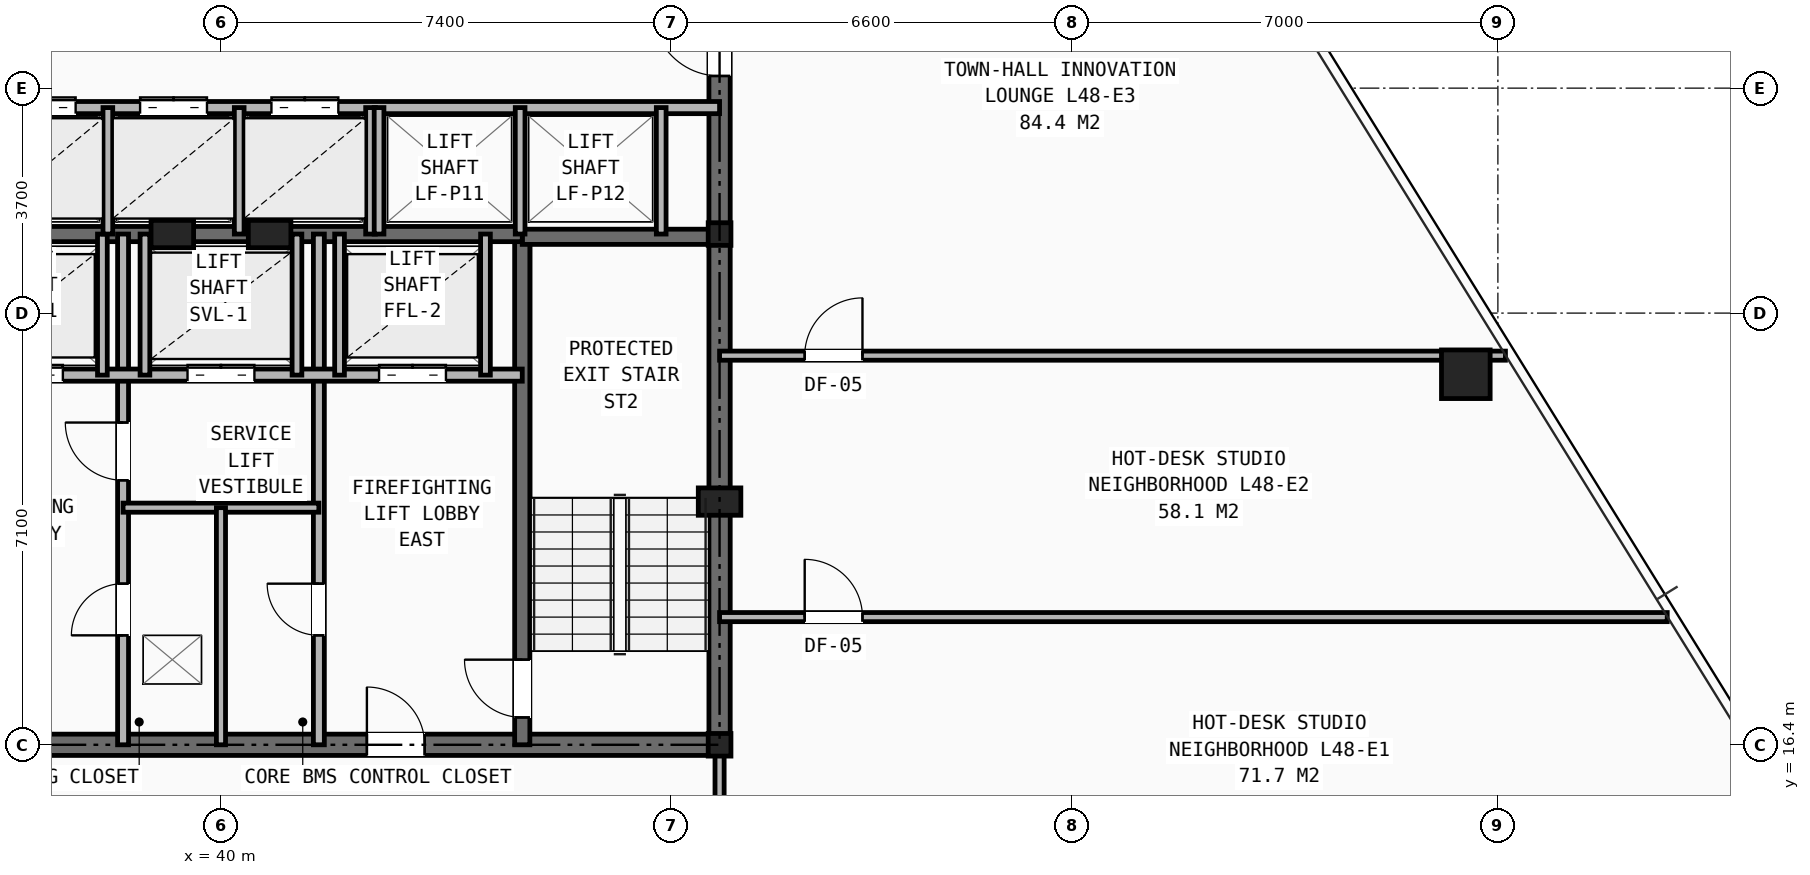
"""IFC4 building model, lengths in metres.
Left out: names, types, materials, properties, quantities, classifications, styles, units other than length and angle.
Written with IfcOpenShell. Run it as: python <this file> out.ifc"""

import sys

from ifc_helpers import new_model, si_unit, direction, frame, frame_2d, origin, origin_2d, place, context, subcontext, project, spatial, rectangle, hollow_rectangle, i_section, extrude, element, fill, save


model = new_model("IFC4")
c1 = context("Model", 3, precision=1e-05, world=origin(), true_north=direction((0.0, 1.0)))
c2 = subcontext(c1, "Body", "Model", "MODEL_VIEW")
j1 = project(units=[si_unit("LENGTHUNIT", "METRE"), si_unit("PLANEANGLEUNIT", "RADIAN")], contexts=[c1])
p1 = place(None, origin())
s1 = spatial("IfcSite", under=j1, at=p1, CompositionType="ELEMENT")
p2 = place(p1, origin())
s2 = spatial("IfcBuilding", under=s1, at=p2, CompositionType="ELEMENT")
p3 = place(p2, frame((0.0, 0.0, 168.9)))
s3 = spatial("IfcBuildingStorey", under=s2, at=p3, CompositionType="ELEMENT", Elevation=168.9)
for number, where, z_axis, x_axis in (
    (1, (48.2, 16.4, 0.0), (0.0, 0.0, 1.0), (1.0, 0.0, 0.0)),
    (2, (48.2, 24.8, 0.0), (0.0, 0.0, 1.0), (1.0, 0.0, 0.0)),
):
    element("IfcColumn", number, at=place(p3, frame(where, z_axis=z_axis, x_axis=x_axis)), inside=s3, PredefinedType="COLUMN", context=c2, shape_type="SweptSolid", body=[
        extrude(i_section(OverallWidth=0.374, OverallDepth=0.372, WebThickness=0.016, FlangeThickness=0.026, at=origin_2d()), origin(), (0.0, 0.0, 1.0), 3.45),
    ])
for number, where, z_axis, x_axis in (
    (3, (48.2, 20.4, 0.0), (0.0, 0.0, 1.0), (1.0, 0.0, 0.0)),
    (4, (39.2, 24.8, 0.0), (0.0, 0.0, 1.0), (1.0, 0.0, 0.0)),
    (5, (40.8, 24.8, 0.0), (0.0, 0.0, 1.0), (1.0, 0.0, 0.0)),
):
    element("IfcColumn", number, at=place(p3, frame(where, z_axis=z_axis, x_axis=x_axis)), inside=s3, PredefinedType="PILASTER", context=c2, shape_type="SweptSolid", body=[
        extrude(rectangle(XDim=0.7, YDim=0.45, at=origin_2d()), origin(), (0.0, 0.0, 1.0), 3.45),
    ])
p4 = place(p3, frame((60.473, 22.494, 0.0), z_axis=(0.0, 0.0, 1.0), x_axis=(1.0, 0.0, 0.0)))
e6 = element("IfcColumn", 6, at=p4, inside=s3, PredefinedType="COLUMN", context=c2, shape_type="SweptSolid", body=[
    extrude(hollow_rectangle(XDim=0.8, YDim=0.8, WallThickness=0.055, at=origin_2d()), origin(), (0.0, 0.0, 1.0), 3.45),
])
p5 = place(p3, frame((31.8, 16.4, 0.0), z_axis=(0.0, 0.0, 1.0), x_axis=(1.0, 0.0, 0.0)))
e7 = element("IfcWall", 7, at=p5, inside=s3, PredefinedType="SHEAR", context=c2, shape_type="SweptSolid", body=[
    extrude(rectangle(XDim=16.4, YDim=0.35, at=frame_2d((8.2, 0.0))), origin(), (0.0, 0.0, 1.0), 3.21),
])
p6 = place(p5, frame((4.2, 0.0, 0.0)))
e8 = element("IfcOpeningElement", 8, at=p6, cuts=e7, PredefinedType="OPENING", context=c2, shape_type="SweptSolid", body=[
    extrude(rectangle(XDim=0.95, YDim=2.1, at=frame_2d((0.475, 1.05))), frame((0.0, 0.185, 0.0), z_axis=(0.0, -1.0, 0.0), x_axis=(1.0, 0.0, 0.0)), (0.0, 0.0, 1.0), 0.37),
])
p7 = place(p5, frame((10.6, 0.0, 0.0)))
e9 = element("IfcOpeningElement", 9, at=p7, cuts=e7, PredefinedType="OPENING", context=c2, shape_type="SweptSolid", body=[
    extrude(rectangle(XDim=0.95, YDim=2.1, at=frame_2d((0.475, 1.05))), frame((0.0, 0.185, 0.0), z_axis=(0.0, -1.0, 0.0), x_axis=(1.0, 0.0, 0.0)), (0.0, 0.0, 1.0), 0.37),
])
p8 = place(p3, frame((48.2, 16.4, 0.0), z_axis=(0.0, 0.0, 1.0), x_axis=(0.0, 1.0, 0.0)))
e10 = element("IfcWall", 10, at=p8, inside=s3, PredefinedType="SHEAR", context=c2, shape_type="SweptSolid", body=[
    extrude(rectangle(XDim=14.8, YDim=0.35, at=frame_2d((7.4, 0.0))), origin(), (0.0, 0.0, 1.0), 3.21),
])
p9 = place(p8, frame((11.0, 0.0, 0.0)))
e11 = element("IfcOpeningElement", 11, at=p9, cuts=e10, PredefinedType="OPENING", context=c2, shape_type="SweptSolid", body=[
    extrude(rectangle(XDim=1.1, YDim=2.15, at=frame_2d((0.55, 1.075))), frame((0.0, 0.185, 0.0), z_axis=(0.0, -1.0, 0.0), x_axis=(1.0, 0.0, 0.0)), (0.0, 0.0, 1.0), 0.37),
])
p10 = place(p3, frame((44.955, 16.4, 0.0), z_axis=(0.0, 0.0, 1.0), x_axis=(0.0, 1.0, 0.0)))
e12 = element("IfcWall", 12, at=p10, inside=s3, PredefinedType="SHEAR", context=c2, shape_type="SweptSolid", body=[
    extrude(rectangle(XDim=8.4, YDim=0.25, at=frame_2d((4.2, 0.0))), origin(), (0.0, 0.0, 1.0), 3.21),
])
p11 = place(p10, frame((0.45, 0.0, 0.0)))
e13 = element("IfcOpeningElement", 13, at=p11, cuts=e12, PredefinedType="OPENING", context=c2, shape_type="SweptSolid", body=[
    extrude(rectangle(XDim=0.95, YDim=2.1, at=frame_2d((0.475, 1.05))), frame((0.0, 0.135, 0.0), z_axis=(0.0, -1.0, 0.0), x_axis=(1.0, 0.0, 0.0)), (0.0, 0.0, 1.0), 0.27),
])
p12 = place(p3, frame((44.955, 24.755, 0.0), z_axis=(0.0, 0.0, 1.0), x_axis=(1.0, 0.0, 0.0)))
e14 = element("IfcWall", 14, at=p12, inside=s3, PredefinedType="SHEAR", context=c2, shape_type="SweptSolid", body=[
    extrude(rectangle(XDim=3.245, YDim=0.25, at=frame_2d((1.623, 0.0))), origin(), (0.0, 0.0, 1.0), 3.21),
])
p13 = place(p3, frame((35.045, 24.8, 0.0), z_axis=(0.0, 0.0, 1.0), x_axis=(1.0, 0.0, 0.0)))
e15 = element("IfcWall", 15, at=p13, inside=s3, PredefinedType="SHEAR", context=c2, shape_type="SweptSolid", body=[
    extrude(rectangle(XDim=9.91, YDim=0.25, at=frame_2d((4.955, 0.0))), origin(), (0.0, 0.0, 1.0), 3.21),
])
p14 = place(p3, frame((38.39, 16.4, 0.0), z_axis=(0.0, 0.0, 1.0), x_axis=(0.0, 1.0, 0.0)))
e16 = element("IfcWall", 16, at=p14, inside=s3, PredefinedType="PARTITIONING", context=c2, shape_type="SweptSolid", body=[
    extrude(rectangle(XDim=8.4, YDim=0.18, at=frame_2d((4.2, 0.0))), origin(), (0.0, 0.0, 1.0), 2.665),
])
p15 = place(p14, frame((1.8, 0.0, 0.0)))
e17 = element("IfcOpeningElement", 17, at=p15, cuts=e16, PredefinedType="OPENING", context=c2, shape_type="SweptSolid", body=[
    extrude(rectangle(XDim=0.85, YDim=2.05, at=frame_2d((0.425, 1.025))), frame((0.0, 0.1, 0.0), z_axis=(0.0, -1.0, 0.0), x_axis=(1.0, 0.0, 0.0)), (0.0, 0.0, 1.0), 0.2),
])
p16 = place(p14, frame((4.35, 0.0, 0.0)))
e18 = element("IfcOpeningElement", 18, at=p16, cuts=e16, PredefinedType="OPENING", context=c2, shape_type="SweptSolid", body=[
    extrude(rectangle(XDim=0.95, YDim=2.1, at=frame_2d((0.475, 1.05))), frame((0.0, 0.1, 0.0), z_axis=(0.0, -1.0, 0.0), x_axis=(1.0, 0.0, 0.0)), (0.0, 0.0, 1.0), 0.2),
])
p17 = place(p3, frame((41.61, 16.4, 0.0), z_axis=(0.0, 0.0, 1.0), x_axis=(0.0, 1.0, 0.0)))
e19 = element("IfcWall", 19, at=p17, inside=s3, PredefinedType="PARTITIONING", context=c2, shape_type="SweptSolid", body=[
    extrude(rectangle(XDim=8.4, YDim=0.18, at=frame_2d((4.2, 0.0))), origin(), (0.0, 0.0, 1.0), 2.665),
])
p18 = place(p17, frame((1.8, 0.0, 0.0)))
e20 = element("IfcOpeningElement", 20, at=p18, cuts=e19, PredefinedType="OPENING", context=c2, shape_type="SweptSolid", body=[
    extrude(rectangle(XDim=0.85, YDim=2.05, at=frame_2d((0.425, 1.025))), frame((0.0, 0.1, 0.0), z_axis=(0.0, -1.0, 0.0), x_axis=(1.0, 0.0, 0.0)), (0.0, 0.0, 1.0), 0.2),
])
p19 = place(p3, frame((35.045, 22.48, 0.0), z_axis=(0.0, 0.0, 1.0), x_axis=(1.0, 0.0, 0.0)))
e21 = element("IfcWall", 21, at=p19, inside=s3, PredefinedType="SOLIDWALL", context=c2, shape_type="SweptSolid", body=[
    extrude(rectangle(XDim=9.91, YDim=0.2, at=frame_2d((4.955, 0.0))), origin(), (0.0, 0.0, 1.0), 3.21),
])
p20 = place(p19, frame((1.255, 0.0, 0.0)))
e22 = element("IfcOpeningElement", 22, at=p20, cuts=e21, PredefinedType="OPENING", context=c2, shape_type="SweptSolid", body=[
    extrude(rectangle(XDim=1.1, YDim=2.15, at=frame_2d((0.55, 1.075))), frame((0.0, 0.11, 0.0), z_axis=(0.0, -1.0, 0.0), x_axis=(1.0, 0.0, 0.0)), (0.0, 0.0, 1.0), 0.22),
])
p21 = place(p19, frame((7.555, 0.0, 0.0)))
e23 = element("IfcOpeningElement", 23, at=p21, cuts=e21, PredefinedType="OPENING", context=c2, shape_type="SweptSolid", body=[
    extrude(rectangle(XDim=1.1, YDim=2.15, at=frame_2d((0.55, 1.075))), frame((0.0, 0.11, 0.0), z_axis=(0.0, -1.0, 0.0), x_axis=(1.0, 0.0, 0.0)), (0.0, 0.0, 1.0), 0.22),
])
p22 = place(p19, frame((4.405, 0.0, 0.0)))
e24 = element("IfcOpeningElement", 24, at=p22, cuts=e21, PredefinedType="OPENING", context=c2, shape_type="SweptSolid", body=[
    extrude(rectangle(XDim=1.1, YDim=2.15, at=frame_2d((0.55, 1.075))), frame((0.0, 0.11, 0.0), z_axis=(0.0, -1.0, 0.0), x_axis=(1.0, 0.0, 0.0)), (0.0, 0.0, 1.0), 0.22),
])
p23 = place(p3, frame((38.39, 20.3, 0.0), z_axis=(0.0, 0.0, 1.0), x_axis=(1.0, 0.0, 0.0)))
e25 = element("IfcWall", 25, at=p23, inside=s3, PredefinedType="PARTITIONING", context=c2, shape_type="SweptSolid", body=[
    extrude(rectangle(XDim=3.22, YDim=0.15, at=frame_2d((1.61, 0.0))), origin(), (0.0, 0.0, 1.0), 3.21),
])
p24 = place(p3, frame((40.0, 16.4, 0.0), z_axis=(0.0, 0.0, 1.0), x_axis=(0.0, 1.0, 0.0)))
e26 = element("IfcWall", 26, at=p24, inside=s3, PredefinedType="PARTITIONING", context=c2, shape_type="SweptSolid", body=[
    extrude(rectangle(XDim=3.9, YDim=0.15, at=frame_2d((1.95, 0.0))), origin(), (0.0, 0.0, 1.0), 2.665),
])
for number, where, z_axis, x_axis in (
    (27, (38.05, 22.48, 0.0), (0.0, 0.0, 1.0), (0.0, 1.0, 0.0)),
    (28, (41.95, 22.48, 0.0), (0.0, 0.0, 1.0), (0.0, 1.0, 0.0)),
    (29, (44.35, 22.48, 0.0), (0.0, 0.0, 1.0), (0.0, 1.0, 0.0)),
    (30, (38.75, 22.48, 0.0), (0.0, 0.0, 1.0), (0.0, 1.0, 0.0)),
    (31, (41.25, 22.48, 0.0), (0.0, 0.0, 1.0), (0.0, 1.0, 0.0)),
):
    element("IfcWall", number, at=place(p3, frame(where, z_axis=z_axis, x_axis=x_axis)), inside=s3, PredefinedType="SOLIDWALL", context=c2, shape_type="SweptSolid", body=[
        extrude(rectangle(XDim=2.32, YDim=0.16, at=frame_2d((1.16, 0.0))), origin(), (0.0, 0.0, 1.0), 3.21),
    ])
p25 = place(p3, frame((33.82, 26.88, 0.0), z_axis=(0.0, 0.0, 1.0), x_axis=(1.0, 0.0, 0.0)))
e32 = element("IfcWall", 32, at=p25, inside=s3, PredefinedType="SOLIDWALL", context=c2, shape_type="SweptSolid", body=[
    extrude(rectangle(XDim=14.38, YDim=0.2, at=frame_2d((7.19, 0.0))), origin(), (0.0, 0.0, 1.0), 2.665),
])
p26 = place(p25, frame((0.53, 0.0, 0.0)))
e33 = element("IfcOpeningElement", 33, at=p26, cuts=e32, PredefinedType="OPENING", context=c2, shape_type="SweptSolid", body=[
    extrude(rectangle(XDim=1.1, YDim=2.15, at=frame_2d((0.55, 1.075))), frame((0.0, 0.11, 0.0), z_axis=(0.0, -1.0, 0.0), x_axis=(1.0, 0.0, 0.0)), (0.0, 0.0, 1.0), 0.22),
])
p27 = place(p25, frame((2.69, 0.0, 0.0)))
e34 = element("IfcOpeningElement", 34, at=p27, cuts=e32, PredefinedType="OPENING", context=c2, shape_type="SweptSolid", body=[
    extrude(rectangle(XDim=1.1, YDim=2.15, at=frame_2d((0.55, 1.075))), frame((0.0, 0.11, 0.0), z_axis=(0.0, -1.0, 0.0), x_axis=(1.0, 0.0, 0.0)), (0.0, 0.0, 1.0), 0.22),
])
p28 = place(p25, frame((4.85, 0.0, 0.0)))
e35 = element("IfcOpeningElement", 35, at=p28, cuts=e32, PredefinedType="OPENING", context=c2, shape_type="SweptSolid", body=[
    extrude(rectangle(XDim=1.1, YDim=2.15, at=frame_2d((0.55, 1.075))), frame((0.0, 0.11, 0.0), z_axis=(0.0, -1.0, 0.0), x_axis=(1.0, 0.0, 0.0)), (0.0, 0.0, 1.0), 0.22),
])
p29 = place(p25, frame((7.01, 0.0, 0.0)))
e36 = element("IfcOpeningElement", 36, at=p29, cuts=e32, PredefinedType="OPENING", context=c2, shape_type="SweptSolid", body=[
    extrude(rectangle(XDim=1.1, YDim=2.15, at=frame_2d((0.55, 1.075))), frame((0.0, 0.11, 0.0), z_axis=(0.0, -1.0, 0.0), x_axis=(1.0, 0.0, 0.0)), (0.0, 0.0, 1.0), 0.22),
])
for number, where, z_axis, x_axis in (
    (37, (38.14, 24.8, 0.0), (0.0, 0.0, 1.0), (0.0, 1.0, 0.0)),
    (38, (40.3, 24.8, 0.0), (0.0, 0.0, 1.0), (0.0, 1.0, 0.0)),
    (39, (42.46, 24.8, 0.0), (0.0, 0.0, 1.0), (0.0, 1.0, 0.0)),
    (40, (42.6, 24.8, 0.0), (0.0, 0.0, 1.0), (0.0, 1.0, 0.0)),
    (41, (44.92, 24.8, 0.0), (0.0, 0.0, 1.0), (0.0, 1.0, 0.0)),
    (42, (47.24, 24.8, 0.0), (0.0, 0.0, 1.0), (0.0, 1.0, 0.0)),
):
    element("IfcWall", number, at=place(p3, frame(where, z_axis=z_axis, x_axis=x_axis)), inside=s3, PredefinedType="SOLIDWALL", context=c2, shape_type="SweptSolid", body=[
        extrude(rectangle(XDim=2.08, YDim=0.16, at=frame_2d((1.04, 0.0))), origin(), (0.0, 0.0, 1.0), 3.21),
    ])
p30 = place(p3, frame((48.2, 14.1, 0.0), z_axis=(0.0, 0.0, 1.0), x_axis=(0.0, 1.0, 0.0)))
e43 = element("IfcWall", 43, at=p30, inside=s3, PredefinedType="PARTITIONING", context=c2, shape_type="SweptSolid", body=[
    extrude(rectangle(XDim=2.3, YDim=0.15, at=frame_2d((1.15, 0.0))), origin(), (0.0, 0.0, 1.0), 2.665),
])
p31 = place(p3, frame((48.2, 18.5, 0.0), z_axis=(0.0, 0.0, 1.0), x_axis=(1.0, 0.0, 0.0)))
e44 = element("IfcWall", 44, at=p31, inside=s3, PredefinedType="PARTITIONING", context=c2, shape_type="SweptSolid", body=[
    extrude(rectangle(XDim=15.585, YDim=0.15, at=frame_2d((7.792, 0.0))), origin(), (0.0, 0.0, 1.0), 2.589),
])
p32 = place(p31, frame((1.4, 0.0, 0.0)))
e45 = element("IfcOpeningElement", 45, at=p32, cuts=e44, PredefinedType="OPENING", context=c2, shape_type="SweptSolid", body=[
    extrude(rectangle(XDim=0.95, YDim=2.1, at=frame_2d((0.475, 1.05))), frame((0.0, 0.085, 0.0), z_axis=(0.0, -1.0, 0.0), x_axis=(1.0, 0.0, 0.0)), (0.0, 0.0, 1.0), 0.17),
])
p33 = place(p3, frame((48.2, 22.8, 0.0), z_axis=(0.0, 0.0, 1.0), x_axis=(1.0, 0.0, 0.0)))
e46 = element("IfcWall", 46, at=p33, inside=s3, PredefinedType="PARTITIONING", context=c2, shape_type="SweptSolid", body=[
    extrude(rectangle(XDim=12.924, YDim=0.15, at=frame_2d((6.462, 0.0))), origin(), (0.0, 0.0, 1.0), 2.589),
])
p34 = place(p33, frame((1.4, 0.0, 0.0)))
e47 = element("IfcOpeningElement", 47, at=p34, cuts=e46, PredefinedType="OPENING", context=c2, shape_type="SweptSolid", body=[
    extrude(rectangle(XDim=0.95, YDim=2.1, at=frame_2d((0.475, 1.05))), frame((0.0, 0.085, 0.0), z_axis=(0.0, -1.0, 0.0), x_axis=(1.0, 0.0, 0.0)), (0.0, 0.0, 1.0), 0.17),
])
p35 = place(p15, origin())
e48 = element("IfcDoor", 48, at=p35, inside=s3, OperationType="SINGLE_SWING_LEFT", PredefinedType="DOOR", context=c2, shape_type="SweptSolid", body=[
    extrude(rectangle(XDim=0.85, YDim=2.05, at=frame_2d((0.425, 1.025))), frame((0.0, 0.025, 0.0), z_axis=(0.0, -1.0, 0.0), x_axis=(1.0, 0.0, 0.0)), (0.0, 0.0, 1.0), 0.05),
])
fill(e17, e48)
p36 = place(p18, origin())
e49 = element("IfcDoor", 49, at=p36, inside=s3, OperationType="SINGLE_SWING_RIGHT", PredefinedType="DOOR", context=c2, shape_type="SweptSolid", body=[
    extrude(rectangle(XDim=0.85, YDim=2.05, at=frame_2d((0.425, 1.025))), frame((0.0, 0.025, 0.0), z_axis=(0.0, -1.0, 0.0), x_axis=(1.0, 0.0, 0.0)), (0.0, 0.0, 1.0), 0.05),
])
fill(e20, e49)
p37 = place(p16, origin())
e50 = element("IfcDoor", 50, at=p37, inside=s3, OperationType="SINGLE_SWING_RIGHT", PredefinedType="DOOR", context=c2, shape_type="SweptSolid", body=[
    extrude(rectangle(XDim=0.95, YDim=2.1, at=frame_2d((0.475, 1.05))), frame((0.0, 0.025, 0.0), z_axis=(0.0, -1.0, 0.0), x_axis=(1.0, 0.0, 0.0)), (0.0, 0.0, 1.0), 0.05),
])
fill(e18, e50)
p38 = place(p11, origin())
e51 = element("IfcDoor", 51, at=p38, inside=s3, OperationType="SINGLE_SWING_RIGHT", PredefinedType="DOOR", context=c2, shape_type="SweptSolid", body=[
    extrude(rectangle(XDim=0.95, YDim=2.1, at=frame_2d((0.475, 1.05))), frame((0.0, 0.025, 0.0), z_axis=(0.0, -1.0, 0.0), x_axis=(1.0, 0.0, 0.0)), (0.0, 0.0, 1.0), 0.05),
])
fill(e13, e51)
p39 = place(p7, origin())
e52 = element("IfcDoor", 52, at=p39, inside=s3, OperationType="SINGLE_SWING_LEFT", PredefinedType="DOOR", context=c2, shape_type="SweptSolid", body=[
    extrude(rectangle(XDim=0.95, YDim=2.1, at=frame_2d((0.475, 1.05))), frame((0.0, 0.025, 0.0), z_axis=(0.0, -1.0, 0.0), x_axis=(1.0, 0.0, 0.0)), (0.0, 0.0, 1.0), 0.05),
])
fill(e9, e52)
p40 = place(p20, origin())
e53 = element("IfcDoor", 53, at=p40, inside=s3, OperationType="DOUBLE_DOOR_SLIDING", PredefinedType="DOOR", context=c2, shape_type="SweptSolid", body=[
    extrude(rectangle(XDim=1.1, YDim=2.15, at=frame_2d((0.55, 1.075))), frame((0.0, 0.025, 0.0), z_axis=(0.0, -1.0, 0.0), x_axis=(1.0, 0.0, 0.0)), (0.0, 0.0, 1.0), 0.05),
])
fill(e22, e53)
p41 = place(p21, origin())
e54 = element("IfcDoor", 54, at=p41, inside=s3, OperationType="DOUBLE_DOOR_SLIDING", PredefinedType="DOOR", context=c2, shape_type="SweptSolid", body=[
    extrude(rectangle(XDim=1.1, YDim=2.15, at=frame_2d((0.55, 1.075))), frame((0.0, 0.025, 0.0), z_axis=(0.0, -1.0, 0.0), x_axis=(1.0, 0.0, 0.0)), (0.0, 0.0, 1.0), 0.05),
])
fill(e23, e54)
p42 = place(p22, origin())
e55 = element("IfcDoor", 55, at=p42, inside=s3, OperationType="DOUBLE_DOOR_SLIDING", PredefinedType="DOOR", context=c2, shape_type="SweptSolid", body=[
    extrude(rectangle(XDim=1.1, YDim=2.15, at=frame_2d((0.55, 1.075))), frame((0.0, 0.025, 0.0), z_axis=(0.0, -1.0, 0.0), x_axis=(1.0, 0.0, 0.0)), (0.0, 0.0, 1.0), 0.05),
])
fill(e24, e55)
p43 = place(p9, origin())
e56 = element("IfcDoor", 56, at=p43, inside=s3, OperationType="SINGLE_SWING_RIGHT", PredefinedType="DOOR", context=c2, shape_type="SweptSolid", body=[
    extrude(rectangle(XDim=1.1, YDim=2.15, at=frame_2d((0.55, 1.075))), frame((0.0, 0.025, 0.0), z_axis=(0.0, -1.0, 0.0), x_axis=(1.0, 0.0, 0.0)), (0.0, 0.0, 1.0), 0.05),
])
fill(e11, e56)
p44 = place(p27, origin())
e57 = element("IfcDoor", 57, at=p44, inside=s3, OperationType="DOUBLE_DOOR_SLIDING", PredefinedType="DOOR", context=c2, shape_type="SweptSolid", body=[
    extrude(rectangle(XDim=1.1, YDim=2.15, at=frame_2d((0.55, 1.075))), frame((0.0, 0.025, 0.0), z_axis=(0.0, -1.0, 0.0), x_axis=(1.0, 0.0, 0.0)), (0.0, 0.0, 1.0), 0.05),
])
fill(e34, e57)
p45 = place(p28, origin())
e58 = element("IfcDoor", 58, at=p45, inside=s3, OperationType="DOUBLE_DOOR_SLIDING", PredefinedType="DOOR", context=c2, shape_type="SweptSolid", body=[
    extrude(rectangle(XDim=1.1, YDim=2.15, at=frame_2d((0.55, 1.075))), frame((0.0, 0.025, 0.0), z_axis=(0.0, -1.0, 0.0), x_axis=(1.0, 0.0, 0.0)), (0.0, 0.0, 1.0), 0.05),
])
fill(e35, e58)
p46 = place(p29, origin())
e59 = element("IfcDoor", 59, at=p46, inside=s3, OperationType="DOUBLE_DOOR_SLIDING", PredefinedType="DOOR", context=c2, shape_type="SweptSolid", body=[
    extrude(rectangle(XDim=1.1, YDim=2.15, at=frame_2d((0.55, 1.075))), frame((0.0, 0.025, 0.0), z_axis=(0.0, -1.0, 0.0), x_axis=(1.0, 0.0, 0.0)), (0.0, 0.0, 1.0), 0.05),
])
fill(e36, e59)
p47 = place(p32, origin())
e60 = element("IfcDoor", 60, at=p47, inside=s3, OperationType="SINGLE_SWING_LEFT", PredefinedType="DOOR", context=c2, shape_type="SweptSolid", body=[
    extrude(rectangle(XDim=0.95, YDim=2.1, at=frame_2d((0.475, 1.05))), frame((0.0, 0.025, 0.0), z_axis=(0.0, -1.0, 0.0), x_axis=(1.0, 0.0, 0.0)), (0.0, 0.0, 1.0), 0.05),
])
fill(e45, e60)
p48 = place(p34, origin())
e61 = element("IfcDoor", 61, at=p48, inside=s3, OperationType="SINGLE_SWING_RIGHT", PredefinedType="DOOR", context=c2, shape_type="SweptSolid", body=[
    extrude(rectangle(XDim=0.95, YDim=2.1, at=frame_2d((0.475, 1.05))), frame((0.0, 0.025, 0.0), z_axis=(0.0, -1.0, 0.0), x_axis=(1.0, 0.0, 0.0)), (0.0, 0.0, 1.0), 0.05),
])
fill(e47, e61)
save(model, sys.argv[1])
